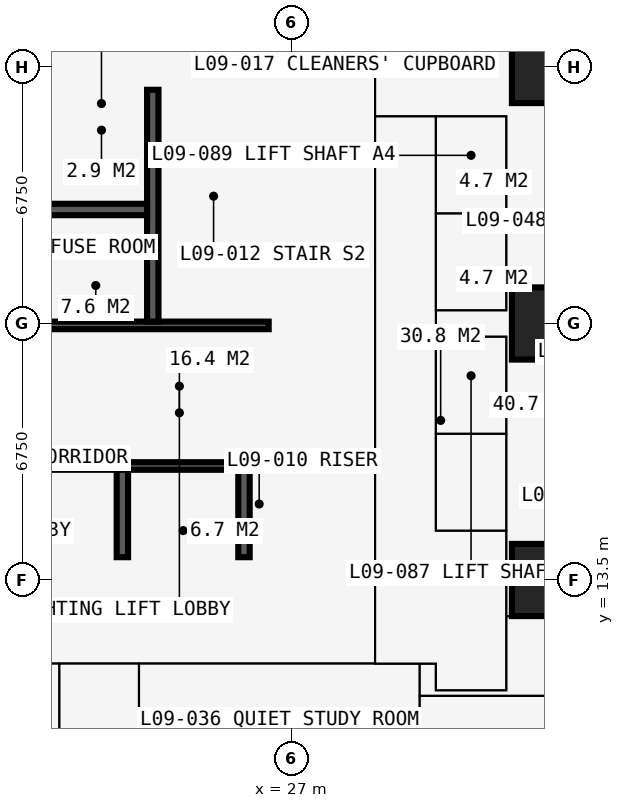
"""IFC4 building model, lengths in metres.
Left out: names, types, materials, properties, quantities, classifications, styles, units other than length and angle.
Written with IfcOpenShell. Run it as: python <this file> out.ifc"""

import sys

from ifc_helpers import new_model, si_unit, direction, frame, frame_2d, origin, origin_2d, place, context, subcontext, project, spatial, rectangle, extrude, element, fill, save


model = new_model("IFC4")
c1 = context("Model", 3, precision=1e-05, world=origin(), true_north=direction((0.0, 1.0)))
c2 = subcontext(c1, "Body", "Model", "MODEL_VIEW")
j1 = project(units=[si_unit("LENGTHUNIT", "METRE"), si_unit("PLANEANGLEUNIT", "RADIAN")], contexts=[c1])
p1 = place(None, origin())
s1 = spatial("IfcSite", under=j1, at=p1, CompositionType="ELEMENT")
p2 = place(p1, origin())
s2 = spatial("IfcBuilding", under=s1, at=p2, CompositionType="ELEMENT")
p3 = place(p2, frame((0.0, 0.0, 36.0)))
s3 = spatial("IfcBuildingStorey", under=s2, at=p3, CompositionType="ELEMENT", Elevation=36.0)
for number, where, z_axis, x_axis in (
    (1, (33.75, 13.5, 0.0), (0.0, 0.0, 1.0), (1.0, 0.0, 0.0)),
    (2, (33.75, 20.25, 0.0), (0.0, 0.0, 1.0), (1.0, 0.0, 0.0)),
    (3, (33.75, 27.0, 0.0), (0.0, 0.0, 1.0), (1.0, 0.0, 0.0)),
):
    element("IfcColumn", number, at=place(p3, frame(where, z_axis=z_axis, x_axis=x_axis)), inside=s3, PredefinedType="COLUMN", context=c2, shape_type="SweptSolid", body=[
        extrude(rectangle(XDim=1.9, YDim=1.9, at=origin_2d()), origin(), (0.0, 0.0, 1.0), 3.6),
    ])
p4 = place(p3, frame((12.9, 13.5, 0.0), z_axis=(0.0, 0.0, 1.0), x_axis=(1.0, 0.0, 0.0)))
e4 = element("IfcWall", 4, at=p4, inside=s3, PredefinedType="SHEAR", context=c2, shape_type="SweptSolid", body=[
    extrude(rectangle(XDim=14.7, YDim=1.2, at=frame_2d((7.35, 0.0))), origin(), (0.0, 0.0, 1.0), 3.6),
])
p5 = place(p3, frame((27.0, 14.1, 0.0), z_axis=(0.0, 0.0, 1.0), x_axis=(0.0, 1.0, 0.0)))
e5 = element("IfcWall", 5, at=p5, inside=s3, PredefinedType="SHEAR", context=c2, shape_type="SweptSolid", body=[
    extrude(rectangle(XDim=12.3, YDim=1.2, at=frame_2d((6.15, 0.0))), origin(), (0.0, 0.0, 1.0), 3.6),
])
p6 = place(p5, frame((3.65, 0.0, 0.0)))
e6 = element("IfcOpeningElement", 6, at=p6, cuts=e5, PredefinedType="OPENING", context=c2, shape_type="SweptSolid", body=[
    extrude(rectangle(XDim=1.2, YDim=2.2, at=frame_2d((0.6, 1.1))), frame((0.0, 0.61, 0.0), z_axis=(0.0, -1.0, 0.0), x_axis=(1.0, 0.0, 0.0)), (0.0, 0.0, 1.0), 1.22),
])
p7 = place(p3, frame((27.6, 27.0, 0.0), z_axis=(0.0, 0.0, 1.0), x_axis=(-1.0, 0.0, 0.0)))
e7 = element("IfcWall", 7, at=p7, inside=s3, PredefinedType="SHEAR", context=c2, shape_type="SweptSolid", body=[
    extrude(rectangle(XDim=14.7, YDim=1.2, at=frame_2d((7.35, 0.0))), origin(), (0.0, 0.0, 1.0), 3.6),
])
p8 = place(p7, frame((4.55, 0.0, 0.0)))
e8 = element("IfcOpeningElement", 8, at=p8, cuts=e7, PredefinedType="OPENING", context=c2, shape_type="SweptSolid", body=[
    extrude(rectangle(XDim=0.9, YDim=2.2, at=frame_2d((0.45, 1.1))), frame((0.0, 0.61, 0.0), z_axis=(0.0, -1.0, 0.0), x_axis=(1.0, 0.0, 0.0)), (0.0, 0.0, 1.0), 1.22),
])
p9 = place(p7, frame((7.525, 0.0, 0.0)))
e9 = element("IfcOpeningElement", 9, at=p9, cuts=e7, PredefinedType="OPENING", context=c2, shape_type="SweptSolid", body=[
    extrude(rectangle(XDim=1.0, YDim=2.2, at=frame_2d((0.5, 1.1))), frame((0.0, 0.61, 0.0), z_axis=(0.0, -1.0, 0.0), x_axis=(1.0, 0.0, 0.0)), (0.0, 0.0, 1.0), 1.22),
])
p10 = place(p3, frame((14.1, 16.5, 0.0), z_axis=(0.0, 0.0, 1.0), x_axis=(1.0, 0.0, 0.0)))
e10 = element("IfcWall", 10, at=p10, inside=s3, PredefinedType="SHEAR", context=c2, shape_type="SweptSolid", body=[
    extrude(rectangle(XDim=12.3, YDim=0.2, at=frame_2d((6.15, 0.0))), origin(), (0.0, 0.0, 1.0), 3.6),
])
p11 = place(p10, frame((0.9, 0.0, 0.0)))
e11 = element("IfcOpeningElement", 11, at=p11, cuts=e10, PredefinedType="OPENING", context=c2, shape_type="SweptSolid", body=[
    extrude(rectangle(XDim=1.1, YDim=2.2, at=frame_2d((0.55, 1.1))), frame((0.0, 0.11, 0.0), z_axis=(0.0, -1.0, 0.0), x_axis=(1.0, 0.0, 0.0)), (0.0, 0.0, 1.0), 0.22),
])
p12 = place(p10, frame((9.5, 0.0, 0.0)))
e12 = element("IfcOpeningElement", 12, at=p12, cuts=e10, PredefinedType="OPENING", context=c2, shape_type="SweptSolid", body=[
    extrude(rectangle(XDim=1.1, YDim=2.2, at=frame_2d((0.55, 1.1))), frame((0.0, 0.11, 0.0), z_axis=(0.0, -1.0, 0.0), x_axis=(1.0, 0.0, 0.0)), (0.0, 0.0, 1.0), 0.22),
])
p13 = place(p3, frame((14.1, 20.2, 0.0), z_axis=(0.0, 0.0, 1.0), x_axis=(1.0, 0.0, 0.0)))
e13 = element("IfcWall", 13, at=p13, inside=s3, PredefinedType="SHEAR", context=c2, shape_type="SweptSolid", body=[
    extrude(rectangle(XDim=12.3, YDim=0.2, at=frame_2d((6.15, 0.0))), origin(), (0.0, 0.0, 1.0), 3.6),
])
p14 = place(p13, frame((0.35, 0.0, 0.0)))
e14 = element("IfcOpeningElement", 14, at=p14, cuts=e13, PredefinedType="OPENING", context=c2, shape_type="SweptSolid", body=[
    extrude(rectangle(XDim=1.1, YDim=2.2, at=frame_2d((0.55, 1.1))), frame((0.0, 0.11, 0.0), z_axis=(0.0, -1.0, 0.0), x_axis=(1.0, 0.0, 0.0)), (0.0, 0.0, 1.0), 0.22),
])
p15 = place(p13, frame((9.75, 0.0, 0.0)))
e15 = element("IfcOpeningElement", 15, at=p15, cuts=e13, PredefinedType="OPENING", context=c2, shape_type="SweptSolid", body=[
    extrude(rectangle(XDim=1.1, YDim=2.2, at=frame_2d((0.55, 1.1))), frame((0.0, 0.11, 0.0), z_axis=(0.0, -1.0, 0.0), x_axis=(1.0, 0.0, 0.0)), (0.0, 0.0, 1.0), 0.22),
])
p16 = place(p3, frame((23.35, 20.3, 0.0), z_axis=(0.0, 0.0, 1.0), x_axis=(0.0, 1.0, 0.0)))
e16 = element("IfcWall", 16, at=p16, inside=s3, PredefinedType="SHEAR", context=c2, shape_type="SweptSolid", body=[
    extrude(rectangle(XDim=6.1, YDim=0.3, at=frame_2d((3.05, 0.0))), origin(), (0.0, 0.0, 1.0), 3.6),
])
p17 = place(p3, frame((17.3, 23.25, 0.0), z_axis=(0.0, 0.0, 1.0), x_axis=(1.0, 0.0, 0.0)))
e17 = element("IfcWall", 17, at=p17, inside=s3, PredefinedType="SHEAR", context=c2, shape_type="SweptSolid", body=[
    extrude(rectangle(XDim=5.9, YDim=0.3, at=frame_2d((2.95, 0.0))), origin(), (0.0, 0.0, 1.0), 3.6),
])
for number, where, z_axis, x_axis in (
    (18, (22.55, 14.1, 0.0), (0.0, 0.0, 1.0), (0.0, 1.0, 0.0)),
    (19, (25.75, 14.1, 0.0), (0.0, 0.0, 1.0), (0.0, 1.0, 0.0)),
):
    element("IfcWall", number, at=place(p3, frame(where, z_axis=z_axis, x_axis=x_axis)), inside=s3, PredefinedType="SHEAR", context=c2, shape_type="SweptSolid", body=[
        extrude(rectangle(XDim=2.3, YDim=0.3, at=frame_2d((1.15, 0.0))), origin(), (0.0, 0.0, 1.0), 3.6),
    ])
p18 = place(p3, frame((21.625, 16.6, 0.0), z_axis=(0.0, 0.0, 1.0), x_axis=(0.0, 1.0, 0.0)))
e20 = element("IfcWall", 20, at=p18, inside=s3, PredefinedType="PARTITIONING", context=c2, shape_type="SweptSolid", body=[
    extrude(rectangle(XDim=3.5, YDim=0.15, at=frame_2d((1.75, 0.0))), origin(), (0.0, 0.0, 1.0), 3.375),
])
p19 = place(p18, frame((1.15, 0.0, 0.0)))
e21 = element("IfcOpeningElement", 21, at=p19, cuts=e20, PredefinedType="OPENING", context=c2, shape_type="SweptSolid", body=[
    extrude(rectangle(XDim=1.2, YDim=2.2, at=frame_2d((0.6, 1.1))), frame((0.0, 0.085, 0.0), z_axis=(0.0, -1.0, 0.0), x_axis=(1.0, 0.0, 0.0)), (0.0, 0.0, 1.0), 0.17),
])
p20 = place(p3, frame((20.725, 23.4, 0.0), z_axis=(0.0, 0.0, 1.0), x_axis=(0.0, 1.0, 0.0)))
e22 = element("IfcWall", 22, at=p20, inside=s3, PredefinedType="PARTITIONING", context=c2, shape_type="SweptSolid", body=[
    extrude(rectangle(XDim=3.0, YDim=0.15, at=frame_2d((1.5, 0.0))), origin(), (0.0, 0.0, 1.0), 3.375),
])
p21 = place(p3, frame((20.8, 25.1, 0.0), z_axis=(0.0, 0.0, 1.0), x_axis=(1.0, 0.0, 0.0)))
e23 = element("IfcWall", 23, at=p21, inside=s3, PredefinedType="PARTITIONING", context=c2, shape_type="SweptSolid", body=[
    extrude(rectangle(XDim=2.4, YDim=0.15, at=frame_2d((1.2, 0.0))), origin(), (0.0, 0.0, 1.0), 3.375),
])
p22 = place(p21, frame((0.75, 0.0, 0.0)))
e24 = element("IfcOpeningElement", 24, at=p22, cuts=e23, PredefinedType="OPENING", context=c2, shape_type="SweptSolid", body=[
    extrude(rectangle(XDim=0.9, YDim=2.2, at=frame_2d((0.45, 1.1))), frame((0.0, 0.085, 0.0), z_axis=(0.0, -1.0, 0.0), x_axis=(1.0, 0.0, 0.0)), (0.0, 0.0, 1.0), 0.17),
])
p23 = place(p3, frame((10.125, 11.3, 0.0), z_axis=(0.0, 0.0, 1.0), x_axis=(1.0, 0.0, 0.0)))
e25 = element("IfcWall", 25, at=p23, inside=s3, PredefinedType="PARTITIONING", context=c2, shape_type="SweptSolid", body=[
    extrude(rectangle(XDim=20.675, YDim=0.15, at=frame_2d((10.337, 0.0))), origin(), (0.0, 0.0, 1.0), 3.375),
])
p24 = place(p23, frame((5.2, 0.0, 0.0)))
e26 = element("IfcOpeningElement", 26, at=p24, cuts=e25, PredefinedType="OPENING", context=c2, shape_type="SweptSolid", body=[
    extrude(rectangle(XDim=1.0, YDim=2.2, at=frame_2d((0.5, 1.1))), frame((0.0, 0.085, 0.0), z_axis=(0.0, -1.0, 0.0), x_axis=(1.0, 0.0, 0.0)), (0.0, 0.0, 1.0), 0.17),
])
p25 = place(p23, frame((11.312, 0.0, 0.0)))
e27 = element("IfcOpeningElement", 27, at=p25, cuts=e25, PredefinedType="OPENING", context=c2, shape_type="SweptSolid", body=[
    extrude(rectangle(XDim=1.0, YDim=2.2, at=frame_2d((0.5, 1.1))), frame((0.0, 0.085, 0.0), z_axis=(0.0, -1.0, 0.0), x_axis=(1.0, 0.0, 0.0)), (0.0, 0.0, 1.0), 0.17),
])
p26 = place(p23, frame((2.425, 0.0, 0.0)))
e28 = element("IfcOpeningElement", 28, at=p26, cuts=e25, PredefinedType="OPENING", context=c2, shape_type="SweptSolid", body=[
    extrude(rectangle(XDim=0.95, YDim=2.2, at=frame_2d((0.475, 1.1))), frame((0.0, 0.085, 0.0), z_axis=(0.0, -1.0, 0.0), x_axis=(1.0, 0.0, 0.0)), (0.0, 0.0, 1.0), 0.17),
])
p27 = place(p3, frame((20.887, 7.98, 0.0), z_axis=(0.0, 0.0, 1.0), x_axis=(0.0, 1.0, 0.0)))
e29 = element("IfcWall", 29, at=p27, inside=s3, PredefinedType="PARTITIONING", context=c2, shape_type="SweptSolid", body=[
    extrude(rectangle(XDim=3.32, YDim=0.15, at=frame_2d((1.66, 0.0))), origin(), (0.0, 0.0, 1.0), 3.375),
])
p28 = place(p27, frame((1.2, 0.0, 0.0)))
e30 = element("IfcOpeningElement", 30, at=p28, cuts=e29, PredefinedType="OPENING", context=c2, shape_type="SweptSolid", body=[
    extrude(rectangle(XDim=0.95, YDim=2.2, at=frame_2d((0.475, 1.1))), frame((0.0, 0.085, 0.0), z_axis=(0.0, -1.0, 0.0), x_axis=(1.0, 0.0, 0.0)), (0.0, 0.0, 1.0), 0.17),
])
p29 = place(p3, frame((22.988, 5.65, 0.0), z_axis=(0.0, 0.0, 1.0), x_axis=(0.0, 1.0, 0.0)))
e31 = element("IfcWall", 31, at=p29, inside=s3, PredefinedType="PARTITIONING", context=c2, shape_type="SweptSolid", body=[
    extrude(rectangle(XDim=5.65, YDim=0.15, at=frame_2d((2.825, 0.0))), origin(), (0.0, 0.0, 1.0), 3.375),
])
p30 = place(p3, frame((29.2, 11.3, 0.0), z_axis=(0.0, 0.0, 1.0), x_axis=(0.0, 1.0, 0.0)))
e32 = element("IfcWall", 32, at=p30, inside=s3, PredefinedType="PARTITIONING", context=c2, shape_type="SweptSolid", body=[
    extrude(rectangle(XDim=17.9, YDim=0.2, at=frame_2d((8.95, 0.0))), origin(), (0.0, 0.0, 1.0), 3.375),
])
p31 = place(p30, frame((8.35, 0.0, 0.0)))
e33 = element("IfcOpeningElement", 33, at=p31, cuts=e32, PredefinedType="OPENING", context=c2, shape_type="SweptSolid", body=[
    extrude(rectangle(XDim=1.2, YDim=2.2, at=frame_2d((0.6, 1.1))), frame((0.0, 0.11, 0.0), z_axis=(0.0, -1.0, 0.0), x_axis=(1.0, 0.0, 0.0)), (0.0, 0.0, 1.0), 0.22),
])
p32 = place(p3, frame((29.2, 25.7, 0.0), z_axis=(0.0, 0.0, 1.0), x_axis=(1.0, 0.0, 0.0)))
e34 = element("IfcWall", 34, at=p32, inside=s3, PredefinedType="SHEAR", context=c2, shape_type="SweptSolid", body=[
    extrude(rectangle(XDim=3.45, YDim=0.1, at=frame_2d((1.725, 0.0))), origin(), (0.0, 0.0, 1.0), 3.375),
])
p33 = place(p3, frame((30.375, -0.734, 0.0), z_axis=(0.0, 0.0, 1.0), x_axis=(0.0, 1.0, 0.0)))
e35 = element("IfcWall", 35, at=p33, inside=s3, PredefinedType="PARTITIONING", context=c2, shape_type="SweptSolid", body=[
    extrude(rectangle(XDim=12.034, YDim=0.15, at=frame_2d((6.017, 0.0))), origin(), (0.0, 0.0, 1.0), 3.375),
])
p34 = place(p33, frame((5.134, 0.0, 0.0)))
e36 = element("IfcOpeningElement", 36, at=p34, cuts=e35, PredefinedType="OPENING", context=c2, shape_type="SweptSolid", body=[
    extrude(rectangle(XDim=1.0, YDim=2.2, at=frame_2d((0.5, 1.1))), frame((0.0, 0.085, 0.0), z_axis=(0.0, -1.0, 0.0), x_axis=(1.0, 0.0, 0.0)), (0.0, 0.0, 1.0), 0.17),
])
p35 = place(p3, frame((30.375, 10.45, 0.0), z_axis=(0.0, 0.0, 1.0), x_axis=(1.0, 0.0, 0.0)))
e37 = element("IfcWall", 37, at=p35, inside=s3, PredefinedType="PARTITIONING", context=c2, shape_type="SweptSolid", body=[
    extrude(rectangle(XDim=4.475, YDim=0.15, at=frame_2d((2.238, 0.0))), origin(), (0.0, 0.0, 1.0), 3.375),
])
p36 = place(p35, frame((2.35, 0.0, 0.0)))
e38 = element("IfcOpeningElement", 38, at=p36, cuts=e37, PredefinedType="OPENING", context=c2, shape_type="SweptSolid", body=[
    extrude(rectangle(XDim=0.95, YDim=2.2, at=frame_2d((0.475, 1.1))), frame((0.0, 0.085, 0.0), z_axis=(0.0, -1.0, 0.0), x_axis=(1.0, 0.0, 0.0)), (0.0, 0.0, 1.0), 0.17),
])
p37 = place(p3, frame((30.8, 10.6, 0.0), z_axis=(0.0, 0.0, 1.0), x_axis=(0.0, 1.0, 0.0)))
e39 = element("IfcWall", 39, at=p37, inside=s3, PredefinedType="PARTITIONING", context=c2, shape_type="SweptSolid", body=[
    extrude(rectangle(XDim=0.7, YDim=0.15, at=frame_2d((0.35, 0.0))), origin(), (0.0, 0.0, 1.0), 3.375),
])
p38 = place(p3, frame((30.8, 10.6, 0.0), z_axis=(0.0, 0.0, 1.0), x_axis=(1.0, 0.0, 0.0)))
e40 = element("IfcWall", 40, at=p38, inside=s3, PredefinedType="PARTITIONING", context=c2, shape_type="SweptSolid", body=[
    extrude(rectangle(XDim=1.85, YDim=0.15, at=frame_2d((0.925, 0.0))), origin(), (0.0, 0.0, 1.0), 3.375),
])
p39 = place(p3, frame((30.8, 14.8, 0.0), z_axis=(0.0, 0.0, 1.0), x_axis=(0.0, 1.0, 0.0)))
e41 = element("IfcWall", 41, at=p39, inside=s3, PredefinedType="PARTITIONING", context=c2, shape_type="SweptSolid", body=[
    extrude(rectangle(XDim=10.9, YDim=0.15, at=frame_2d((5.45, 0.0))), origin(), (0.0, 0.0, 1.0), 3.375),
])
p40 = place(p39, frame((0.75, 0.0, 0.0)))
e42 = element("IfcOpeningElement", 42, at=p40, cuts=e41, PredefinedType="OPENING", context=c2, shape_type="SweptSolid", body=[
    extrude(rectangle(XDim=1.1, YDim=2.2, at=frame_2d((0.55, 1.1))), frame((0.0, 0.085, 0.0), z_axis=(0.0, -1.0, 0.0), x_axis=(1.0, 0.0, 0.0)), (0.0, 0.0, 1.0), 0.17),
])
p41 = place(p39, frame((3.25, 0.0, 0.0)))
e43 = element("IfcOpeningElement", 43, at=p41, cuts=e41, PredefinedType="OPENING", context=c2, shape_type="SweptSolid", body=[
    extrude(rectangle(XDim=1.1, YDim=2.2, at=frame_2d((0.55, 1.1))), frame((0.0, 0.085, 0.0), z_axis=(0.0, -1.0, 0.0), x_axis=(1.0, 0.0, 0.0)), (0.0, 0.0, 1.0), 0.17),
])
p42 = place(p39, frame((6.5, 0.0, 0.0)))
e44 = element("IfcOpeningElement", 44, at=p42, cuts=e41, PredefinedType="OPENING", context=c2, shape_type="SweptSolid", body=[
    extrude(rectangle(XDim=1.1, YDim=2.2, at=frame_2d((0.55, 1.1))), frame((0.0, 0.085, 0.0), z_axis=(0.0, -1.0, 0.0), x_axis=(1.0, 0.0, 0.0)), (0.0, 0.0, 1.0), 0.17),
])
p43 = place(p39, frame((9.05, 0.0, 0.0)))
e45 = element("IfcOpeningElement", 45, at=p43, cuts=e41, PredefinedType="OPENING", context=c2, shape_type="SweptSolid", body=[
    extrude(rectangle(XDim=1.1, YDim=2.2, at=frame_2d((0.55, 1.1))), frame((0.0, 0.085, 0.0), z_axis=(0.0, -1.0, 0.0), x_axis=(1.0, 0.0, 0.0)), (0.0, 0.0, 1.0), 0.17),
])
for number, where, z_axis, x_axis in (
    (46, (30.8, 14.8, 0.0), (0.0, 0.0, 1.0), (1.0, 0.0, 0.0)),
    (47, (30.8, 17.35, 0.0), (0.0, 0.0, 1.0), (1.0, 0.0, 0.0)),
    (48, (30.8, 19.9, 0.0), (0.0, 0.0, 1.0), (1.0, 0.0, 0.0)),
    (49, (30.8, 20.6, 0.0), (0.0, 0.0, 1.0), (1.0, 0.0, 0.0)),
    (50, (30.8, 23.15, 0.0), (0.0, 0.0, 1.0), (1.0, 0.0, 0.0)),
):
    element("IfcWall", number, at=place(p3, frame(where, z_axis=z_axis, x_axis=x_axis)), inside=s3, PredefinedType="SHEAR", context=c2, shape_type="SweptSolid", body=[
        extrude(rectangle(XDim=1.85, YDim=0.1, at=frame_2d((0.925, 0.0))), origin(), (0.0, 0.0, 1.0), 3.375),
    ])
p44 = place(p3, frame((32.65, 10.6, 0.0), z_axis=(0.0, 0.0, 1.0), x_axis=(0.0, 1.0, 0.0)))
e51 = element("IfcWall", 51, at=p44, inside=s3, PredefinedType="SHEAR", context=c2, shape_type="SweptSolid", body=[
    extrude(rectangle(XDim=9.3, YDim=0.1, at=frame_2d((4.65, 0.0))), origin(), (0.0, 0.0, 1.0), 3.375),
])
p45 = place(p44, frame((0.5, 0.0, 0.0)))
e52 = element("IfcOpeningElement", 52, at=p45, cuts=e51, PredefinedType="OPENING", context=c2, shape_type="SweptSolid", body=[
    extrude(rectangle(XDim=1.0, YDim=2.2, at=frame_2d((0.5, 1.1))), frame((0.0, 0.06, 0.0), z_axis=(0.0, -1.0, 0.0), x_axis=(1.0, 0.0, 0.0)), (0.0, 0.0, 1.0), 0.12),
])
p46 = place(p3, frame((32.65, 12.55, 0.0), z_axis=(0.0, 0.0, 1.0), x_axis=(1.0, 0.0, 0.0)))
e53 = element("IfcWall", 53, at=p46, inside=s3, PredefinedType="PARTITIONING", context=c2, shape_type="SweptSolid", body=[
    extrude(rectangle(XDim=2.2, YDim=0.15, at=frame_2d((1.1, 0.0))), origin(), (0.0, 0.0, 1.0), 3.375),
])
p47 = place(p3, frame((32.65, 20.6, 0.0), z_axis=(0.0, 0.0, 1.0), x_axis=(0.0, 1.0, 0.0)))
e54 = element("IfcWall", 54, at=p47, inside=s3, PredefinedType="PARTITIONING", context=c2, shape_type="SweptSolid", body=[
    extrude(rectangle(XDim=5.1, YDim=0.15, at=frame_2d((2.55, 0.0))), origin(), (0.0, 0.0, 1.0), 3.375),
])
p48 = place(p12, origin())
e55 = element("IfcDoor", 55, at=p48, inside=s3, OperationType="DOUBLE_DOOR_SLIDING", PredefinedType="DOOR", context=c2, shape_type="SweptSolid", body=[
    extrude(rectangle(XDim=1.1, YDim=2.2, at=frame_2d((0.55, 1.1))), frame((0.0, 0.025, 0.0), z_axis=(0.0, -1.0, 0.0), x_axis=(1.0, 0.0, 0.0)), (0.0, 0.0, 1.0), 0.05),
])
fill(e12, e55)
p49 = place(p6, origin())
e56 = element("IfcDoor", 56, at=p49, inside=s3, OperationType="DOUBLE_DOOR_SINGLE_SWING", PredefinedType="DOOR", context=c2, shape_type="SweptSolid", body=[
    extrude(rectangle(XDim=1.2, YDim=2.2, at=frame_2d((0.6, 1.1))), frame((0.0, 0.025, 0.0), z_axis=(0.0, -1.0, 0.0), x_axis=(1.0, 0.0, 0.0)), (0.0, 0.0, 1.0), 0.05),
])
fill(e6, e56)
p50 = place(p19, origin())
e57 = element("IfcDoor", 57, at=p50, inside=s3, OperationType="DOUBLE_DOOR_SINGLE_SWING", PredefinedType="DOOR", context=c2, shape_type="SweptSolid", body=[
    extrude(rectangle(XDim=1.2, YDim=2.2, at=frame_2d((0.6, 1.1))), frame((0.0, 0.025, 0.0), z_axis=(0.0, -1.0, 0.0), x_axis=(1.0, 0.0, 0.0)), (0.0, 0.0, 1.0), 0.05),
])
fill(e21, e57)
p51 = place(p22, origin())
e58 = element("IfcDoor", 58, at=p51, inside=s3, OperationType="SINGLE_SWING_RIGHT", PredefinedType="DOOR", context=c2, shape_type="SweptSolid", body=[
    extrude(rectangle(XDim=0.9, YDim=2.2, at=frame_2d((0.45, 1.1))), frame((0.0, 0.025, 0.0), z_axis=(0.0, -1.0, 0.0), x_axis=(1.0, 0.0, 0.0)), (0.0, 0.0, 1.0), 0.05),
])
fill(e24, e58)
p52 = place(p8, origin())
e59 = element("IfcDoor", 59, at=p52, inside=s3, OperationType="SINGLE_SWING_LEFT", PredefinedType="DOOR", context=c2, shape_type="SweptSolid", body=[
    extrude(rectangle(XDim=0.9, YDim=2.2, at=frame_2d((0.45, 1.1))), frame((0.0, 0.4, 0.0), z_axis=(0.0, -1.0, 0.0), x_axis=(1.0, 0.0, 0.0)), (0.0, 0.0, 1.0), 0.8),
])
fill(e8, e59)
p53 = place(p15, origin())
e60 = element("IfcDoor", 60, at=p53, inside=s3, OperationType="SINGLE_SWING_LEFT", PredefinedType="DOOR", context=c2, shape_type="SweptSolid", body=[
    extrude(rectangle(XDim=1.1, YDim=2.2, at=frame_2d((0.55, 1.1))), frame((0.0, 0.025, 0.0), z_axis=(0.0, -1.0, 0.0), x_axis=(1.0, 0.0, 0.0)), (0.0, 0.0, 1.0), 0.05),
])
fill(e15, e60)
p54 = place(p25, origin())
e61 = element("IfcDoor", 61, at=p54, inside=s3, OperationType="SINGLE_SWING_LEFT", PredefinedType="DOOR", context=c2, shape_type="SweptSolid", body=[
    extrude(rectangle(XDim=1.0, YDim=2.2, at=frame_2d((0.5, 1.1))), frame((0.0, 0.025, 0.0), z_axis=(0.0, -1.0, 0.0), x_axis=(1.0, 0.0, 0.0)), (0.0, 0.0, 1.0), 0.05),
])
fill(e27, e61)
p55 = place(p28, origin())
e62 = element("IfcDoor", 62, at=p55, inside=s3, OperationType="SINGLE_SWING_LEFT", PredefinedType="DOOR", context=c2, shape_type="SweptSolid", body=[
    extrude(rectangle(XDim=0.95, YDim=2.2, at=frame_2d((0.475, 1.1))), frame((0.0, 0.025, 0.0), z_axis=(0.0, -1.0, 0.0), x_axis=(1.0, 0.0, 0.0)), (0.0, 0.0, 1.0), 0.05),
])
fill(e30, e62)
p56 = place(p45, origin())
e63 = element("IfcDoor", 63, at=p56, inside=s3, OperationType="SINGLE_SWING_LEFT", PredefinedType="DOOR", context=c2, shape_type="SweptSolid", body=[
    extrude(rectangle(XDim=1.0, YDim=2.2, at=frame_2d((0.5, 1.1))), frame((0.0, 0.025, 0.0), z_axis=(0.0, -1.0, 0.0), x_axis=(1.0, 0.0, 0.0)), (0.0, 0.0, 1.0), 0.05),
])
fill(e52, e63)
p57 = place(p36, origin())
e64 = element("IfcDoor", 64, at=p57, inside=s3, OperationType="SINGLE_SWING_LEFT", PredefinedType="DOOR", context=c2, shape_type="SweptSolid", body=[
    extrude(rectangle(XDim=0.95, YDim=2.2, at=frame_2d((0.475, 1.1))), frame((0.0, 0.025, 0.0), z_axis=(0.0, -1.0, 0.0), x_axis=(1.0, 0.0, 0.0)), (0.0, 0.0, 1.0), 0.05),
])
fill(e38, e64)
p58 = place(p40, origin())
e65 = element("IfcDoor", 65, at=p58, inside=s3, OperationType="DOUBLE_DOOR_SLIDING", PredefinedType="DOOR", context=c2, shape_type="SweptSolid", body=[
    extrude(rectangle(XDim=1.1, YDim=2.2, at=frame_2d((0.55, 1.1))), frame((0.0, 0.025, 0.0), z_axis=(0.0, -1.0, 0.0), x_axis=(1.0, 0.0, 0.0)), (0.0, 0.0, 1.0), 0.05),
])
fill(e42, e65)
p59 = place(p41, origin())
e66 = element("IfcDoor", 66, at=p59, inside=s3, OperationType="DOUBLE_DOOR_SLIDING", PredefinedType="DOOR", context=c2, shape_type="SweptSolid", body=[
    extrude(rectangle(XDim=1.1, YDim=2.2, at=frame_2d((0.55, 1.1))), frame((0.0, 0.025, 0.0), z_axis=(0.0, -1.0, 0.0), x_axis=(1.0, 0.0, 0.0)), (0.0, 0.0, 1.0), 0.05),
])
fill(e43, e66)
p60 = place(p42, origin())
e67 = element("IfcDoor", 67, at=p60, inside=s3, OperationType="DOUBLE_DOOR_SLIDING", PredefinedType="DOOR", context=c2, shape_type="SweptSolid", body=[
    extrude(rectangle(XDim=1.1, YDim=2.2, at=frame_2d((0.55, 1.1))), frame((0.0, 0.025, 0.0), z_axis=(0.0, -1.0, 0.0), x_axis=(1.0, 0.0, 0.0)), (0.0, 0.0, 1.0), 0.05),
])
fill(e44, e67)
p61 = place(p43, origin())
e68 = element("IfcDoor", 68, at=p61, inside=s3, OperationType="DOUBLE_DOOR_SLIDING", PredefinedType="DOOR", context=c2, shape_type="SweptSolid", body=[
    extrude(rectangle(XDim=1.1, YDim=2.2, at=frame_2d((0.55, 1.1))), frame((0.0, 0.025, 0.0), z_axis=(0.0, -1.0, 0.0), x_axis=(1.0, 0.0, 0.0)), (0.0, 0.0, 1.0), 0.05),
])
fill(e45, e68)
p62 = place(p31, origin())
e69 = element("IfcDoor", 69, at=p62, inside=s3, OperationType="DOUBLE_DOOR_SINGLE_SWING", PredefinedType="DOOR", context=c2, shape_type="SweptSolid", body=[
    extrude(rectangle(XDim=1.2, YDim=2.2, at=frame_2d((0.6, 1.1))), frame((0.0, 0.025, 0.0), z_axis=(0.0, -1.0, 0.0), x_axis=(1.0, 0.0, 0.0)), (0.0, 0.0, 1.0), 0.05),
])
fill(e33, e69)
save(model, sys.argv[1])
